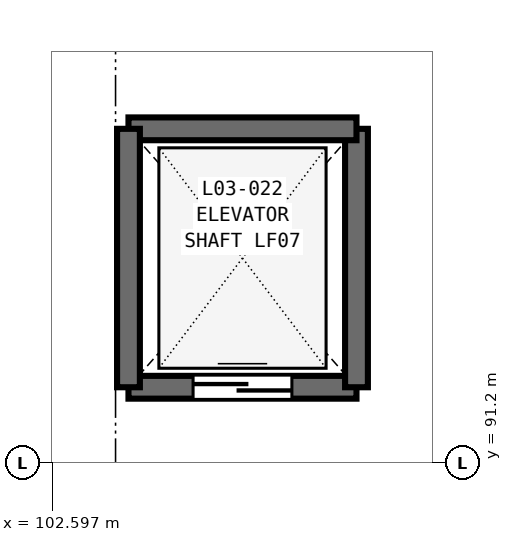
"""IFC4 building model, lengths in metres.
Left out: names, types, materials, properties, quantities, classifications, styles, units other than length and angle.
Written with IfcOpenShell. Run it as: python <this file> out.ifc"""

import sys

from ifc_helpers import new_model, si_unit, direction, frame, frame_2d, origin, place, context, subcontext, project, spatial, rectangle, extrude, element, fill, save


model = new_model("IFC4")
c1 = context("Model", 3, precision=1e-05, world=origin(), true_north=direction((0.0, 1.0)))
c2 = subcontext(c1, "Body", "Model", "MODEL_VIEW")
j1 = project(units=[si_unit("LENGTHUNIT", "METRE"), si_unit("PLANEANGLEUNIT", "RADIAN")], contexts=[c1])
p1 = place(None, origin())
s1 = spatial("IfcSite", under=j1, at=p1, CompositionType="ELEMENT")
p2 = place(p1, origin())
s2 = spatial("IfcBuilding", under=s1, at=p2, CompositionType="ELEMENT")
p3 = place(p2, frame((0.0, 0.0, 16.2)))
s3 = spatial("IfcBuildingStorey", under=s2, at=p3, CompositionType="ELEMENT", Elevation=16.2)
p4 = place(p3, frame((103.6, 92.2, 0.0), z_axis=(0.0, 0.0, 1.0), x_axis=(1.0, 0.0, 0.0)))
e1 = element("IfcWall", 1, at=p4, inside=s3, PredefinedType="SHEAR", context=c2, shape_type="SweptSolid", body=[
    extrude(rectangle(XDim=3.0, YDim=0.3, at=frame_2d((1.5, 0.0))), origin(), (0.0, 0.0, 1.0), 4.2),
])
p5 = place(p4, frame((0.85, 0.0, 0.0)))
e2 = element("IfcOpeningElement", 2, at=p5, cuts=e1, PredefinedType="OPENING", context=c2, shape_type="SweptSolid", body=[
    extrude(rectangle(XDim=1.3, YDim=2.2, at=frame_2d((0.65, 1.1))), frame((0.0, 0.16, 0.0), z_axis=(0.0, -1.0, 0.0), x_axis=(1.0, 0.0, 0.0)), (0.0, 0.0, 1.0), 0.32),
])
p6 = place(p3, frame((106.6, 92.2, 0.0), z_axis=(0.0, 0.0, 1.0), x_axis=(0.0, 1.0, 0.0)))
e3 = element("IfcWall", 3, at=p6, inside=s3, PredefinedType="SHEAR", context=c2, shape_type="SweptSolid", body=[
    extrude(rectangle(XDim=3.4, YDim=0.3, at=frame_2d((1.7, 0.0))), origin(), (0.0, 0.0, 1.0), 4.2),
])
p7 = place(p3, frame((106.6, 95.6, 0.0), z_axis=(0.0, 0.0, 1.0), x_axis=(-1.0, 0.0, 0.0)))
e4 = element("IfcWall", 4, at=p7, inside=s3, PredefinedType="SHEAR", context=c2, shape_type="SweptSolid", body=[
    extrude(rectangle(XDim=3.0, YDim=0.3, at=frame_2d((1.5, 0.0))), origin(), (0.0, 0.0, 1.0), 4.2),
])
p8 = place(p3, frame((103.6, 95.6, 0.0), z_axis=(0.0, 0.0, 1.0), x_axis=(0.0, -1.0, 0.0)))
e5 = element("IfcWall", 5, at=p8, inside=s3, PredefinedType="SHEAR", context=c2, shape_type="SweptSolid", body=[
    extrude(rectangle(XDim=3.4, YDim=0.3, at=frame_2d((1.7, 0.0))), origin(), (0.0, 0.0, 1.0), 4.2),
])
p9 = place(p5, origin())
e6 = element("IfcDoor", 6, at=p9, inside=s3, OperationType="DOUBLE_DOOR_SLIDING", PredefinedType="DOOR", context=c2, shape_type="SweptSolid", body=[
    extrude(rectangle(XDim=1.3, YDim=2.2, at=frame_2d((0.65, 1.1))), frame((0.0, 0.025, 0.0), z_axis=(0.0, -1.0, 0.0), x_axis=(1.0, 0.0, 0.0)), (0.0, 0.0, 1.0), 0.05),
])
fill(e2, e6)
save(model, sys.argv[1])
